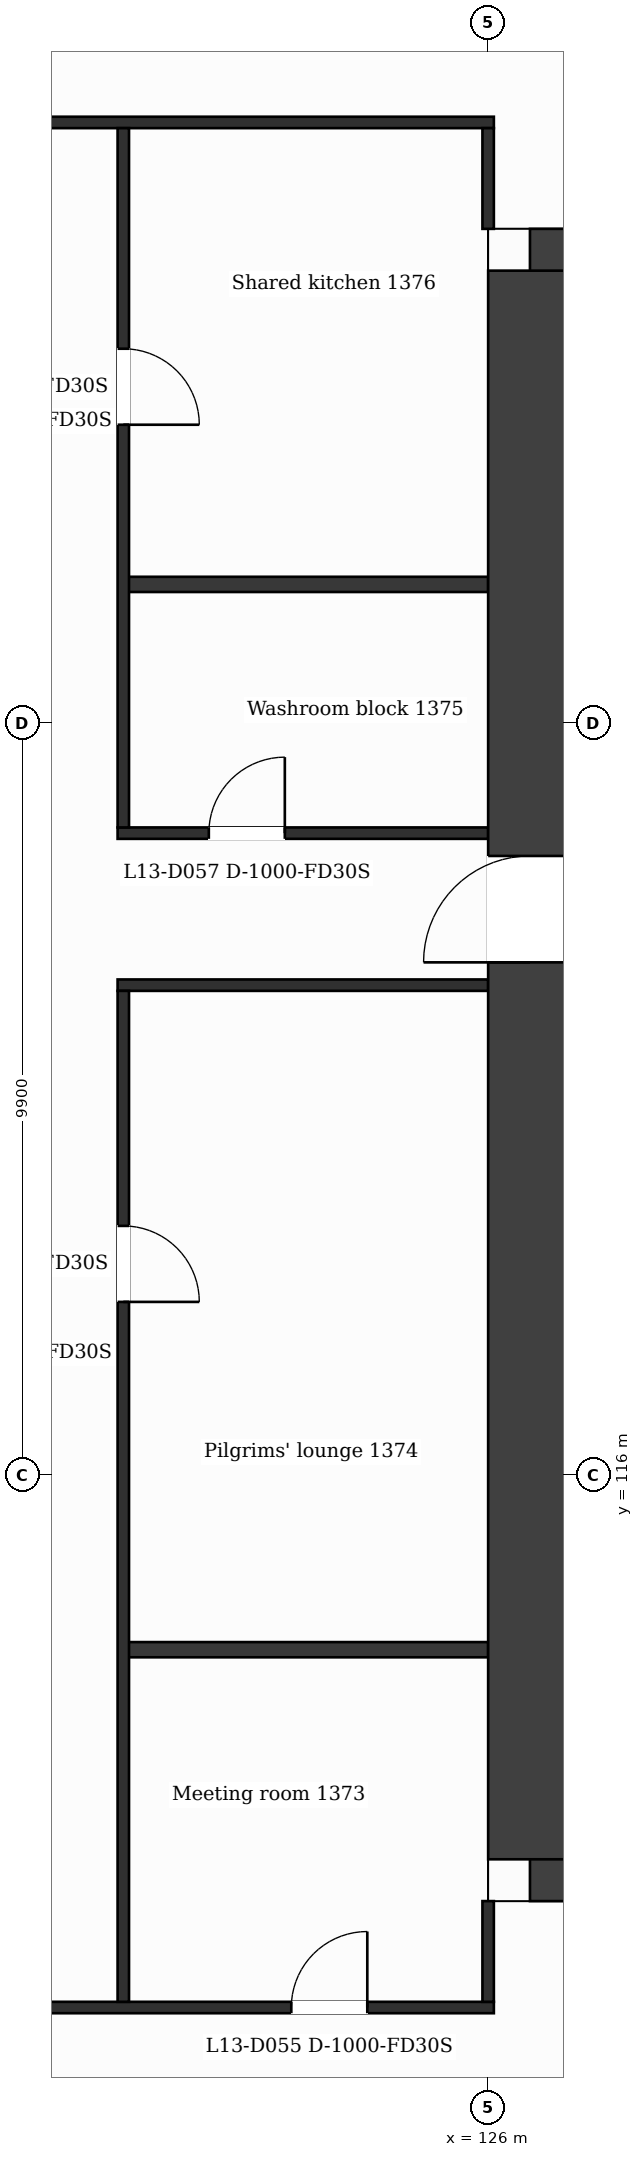
"""IFC4 building model, lengths in metres.
Left out: names, types, materials, properties, quantities, classifications, styles, units other than length and angle.
Written with IfcOpenShell. Run it as: python <this file> out.ifc"""

import sys

from ifc_helpers import new_model, si_unit, direction, frame, frame_2d, origin, place, context, subcontext, project, spatial, rectangle, extrude, element, fill, save


model = new_model("IFC4")
c1 = context("Model", 3, precision=1e-05, world=origin(), true_north=direction((0.0, 1.0)))
c2 = subcontext(c1, "Body", "Model", "MODEL_VIEW")
j1 = project(units=[si_unit("LENGTHUNIT", "METRE"), si_unit("PLANEANGLEUNIT", "RADIAN")], contexts=[c1])
p1 = place(None, origin())
s1 = spatial("IfcSite", under=j1, at=p1, CompositionType="ELEMENT")
p2 = place(p1, origin())
s2 = spatial("IfcBuilding", under=s1, at=p2, CompositionType="ELEMENT")
p3 = place(p2, frame((0.0, 0.0, 63.5)))
s3 = spatial("IfcBuildingStorey", under=s2, at=p3, CompositionType="ELEMENT", Elevation=63.5)
p4 = place(p3, frame((126.55, 131.85, 0.0), z_axis=(0.0, 0.0, 1.0), x_axis=(1.0, 0.0, 0.0)))
e1 = element("IfcWall", 1, at=p4, inside=s3, PredefinedType="SHEAR", context=c2, shape_type="SweptSolid", body=[
    extrude(rectangle(XDim=11.138, YDim=1.1, at=frame_2d((5.569, 0.0))), origin(), (0.0, 0.0, 1.0), 3.5),
])
p5 = place(p4, frame((3.386, 0.0, 0.0)))
e2 = element("IfcOpeningElement", 2, at=p5, cuts=e1, PredefinedType="OPENING", context=c2, shape_type="SweptSolid", body=[
    extrude(rectangle(XDim=1.2, YDim=2.1, at=frame_2d((0.6, 1.05))), frame((0.0, 0.56, 0.0), z_axis=(0.0, -1.0, 0.0), x_axis=(1.0, 0.0, 0.0)), (0.0, 0.0, 1.0), 1.12),
])
p6 = place(p3, frame((140.502, 110.95, 0.0), z_axis=(0.0, 0.0, 1.0), x_axis=(-1.0, 0.0, 0.0)))
e3 = element("IfcWall", 3, at=p6, inside=s3, PredefinedType="SHEAR", context=c2, shape_type="SweptSolid", body=[
    extrude(rectangle(XDim=13.952, YDim=1.1, at=frame_2d((6.976, 0.0))), origin(), (0.0, 0.0, 1.0), 3.5),
])
p7 = place(p6, frame((6.804, 0.0, 0.0)))
e4 = element("IfcOpeningElement", 4, at=p7, cuts=e3, PredefinedType="OPENING", context=c2, shape_type="SweptSolid", body=[
    extrude(rectangle(XDim=1.4, YDim=2.1, at=frame_2d((0.7, 1.05))), frame((0.0, 0.56, 0.0), z_axis=(0.0, -1.0, 0.0), x_axis=(1.0, 0.0, 0.0)), (0.0, 0.0, 1.0), 1.12),
])
p8 = place(p3, frame((126.55, 110.95, 0.0), z_axis=(0.0, 0.0, 1.0), x_axis=(0.0, 1.0, 0.0)))
e5 = element("IfcWall", 5, at=p8, inside=s3, PredefinedType="SHEAR", context=c2, shape_type="SweptSolid", body=[
    extrude(rectangle(XDim=20.9, YDim=1.1, at=frame_2d((10.45, 0.0))), origin(), (0.0, 0.0, 1.0), 3.5),
])
p9 = place(p8, frame((11.8, 0.0, 0.0)))
e6 = element("IfcOpeningElement", 6, at=p9, cuts=e5, PredefinedType="OPENING", context=c2, shape_type="SweptSolid", body=[
    extrude(rectangle(XDim=1.4, YDim=2.1, at=frame_2d((0.7, 1.05))), frame((0.0, 0.56, 0.0), z_axis=(0.0, -1.0, 0.0), x_axis=(1.0, 0.0, 0.0)), (0.0, 0.0, 1.0), 1.12),
])
p10 = place(p3, frame((100.725, 109.0, 0.0), z_axis=(0.0, 0.0, 1.0), x_axis=(1.0, 0.0, 0.0)))
e7 = element("IfcWall", 7, at=p10, inside=s3, PredefinedType="PARTITIONING", context=c2, shape_type="SweptSolid", body=[
    extrude(rectangle(XDim=25.35, YDim=0.15, at=frame_2d((12.675, 0.0))), origin(), (0.0, 0.0, 1.0), 3.18),
])
p11 = place(p10, frame((1.975, 0.0, 0.0)))
e8 = element("IfcOpeningElement", 8, at=p11, cuts=e7, PredefinedType="OPENING", context=c2, shape_type="SweptSolid", body=[
    extrude(rectangle(XDim=1.0, YDim=2.1, at=frame_2d((0.5, 1.05))), frame((0.0, 0.085, 0.0), z_axis=(0.0, -1.0, 0.0), x_axis=(1.0, 0.0, 0.0)), (0.0, 0.0, 1.0), 0.17),
])
p12 = place(p10, frame((10.325, 0.0, 0.0)))
e9 = element("IfcOpeningElement", 9, at=p12, cuts=e7, PredefinedType="OPENING", context=c2, shape_type="SweptSolid", body=[
    extrude(rectangle(XDim=1.0, YDim=2.1, at=frame_2d((0.5, 1.05))), frame((0.0, 0.085, 0.0), z_axis=(0.0, -1.0, 0.0), x_axis=(1.0, 0.0, 0.0)), (0.0, 0.0, 1.0), 0.17),
])
p13 = place(p10, frame((14.9, 0.0, 0.0)))
e10 = element("IfcOpeningElement", 10, at=p13, cuts=e7, PredefinedType="OPENING", context=c2, shape_type="SweptSolid", body=[
    extrude(rectangle(XDim=1.0, YDim=2.1, at=frame_2d((0.5, 1.05))), frame((0.0, 0.085, 0.0), z_axis=(0.0, -1.0, 0.0), x_axis=(1.0, 0.0, 0.0)), (0.0, 0.0, 1.0), 0.17),
])
p14 = place(p10, frame((22.685, 0.0, 0.0)))
e11 = element("IfcOpeningElement", 11, at=p14, cuts=e7, PredefinedType="OPENING", context=c2, shape_type="SweptSolid", body=[
    extrude(rectangle(XDim=1.0, YDim=2.1, at=frame_2d((0.5, 1.05))), frame((0.0, 0.085, 0.0), z_axis=(0.0, -1.0, 0.0), x_axis=(1.0, 0.0, 0.0)), (0.0, 0.0, 1.0), 0.17),
])
p15 = place(p3, frame((121.2, 113.708, 0.0), z_axis=(0.0, 0.0, 1.0), x_axis=(1.0, 0.0, 0.0)))
e12 = element("IfcWall", 12, at=p15, inside=s3, PredefinedType="PARTITIONING", context=c2, shape_type="SweptSolid", body=[
    extrude(rectangle(XDim=4.8, YDim=0.2, at=frame_2d((2.4, 0.0))), origin(), (0.0, 0.0, 1.0), 3.18),
])
p16 = place(p3, frame((121.125, 122.45, 0.0), z_axis=(0.0, 0.0, 1.0), x_axis=(1.0, 0.0, 0.0)))
e13 = element("IfcWall", 13, at=p16, inside=s3, PredefinedType="PARTITIONING", context=c2, shape_type="SweptSolid", body=[
    extrude(rectangle(XDim=4.875, YDim=0.15, at=frame_2d((2.438, 0.0))), origin(), (0.0, 0.0, 1.0), 3.18),
])
p17 = place(p3, frame((121.125, 124.45, 0.0), z_axis=(0.0, 0.0, 1.0), x_axis=(1.0, 0.0, 0.0)))
e14 = element("IfcWall", 14, at=p17, inside=s3, PredefinedType="PARTITIONING", context=c2, shape_type="SweptSolid", body=[
    extrude(rectangle(XDim=4.875, YDim=0.15, at=frame_2d((2.438, 0.0))), origin(), (0.0, 0.0, 1.0), 3.18),
])
p18 = place(p17, frame((1.2, 0.0, 0.0)))
e15 = element("IfcOpeningElement", 15, at=p18, cuts=e14, PredefinedType="OPENING", context=c2, shape_type="SweptSolid", body=[
    extrude(rectangle(XDim=1.0, YDim=2.1, at=frame_2d((0.5, 1.05))), frame((0.0, 0.085, 0.0), z_axis=(0.0, -1.0, 0.0), x_axis=(1.0, 0.0, 0.0)), (0.0, 0.0, 1.0), 0.17),
])
p19 = place(p3, frame((121.2, 127.722, 0.0), z_axis=(0.0, 0.0, 1.0), x_axis=(1.0, 0.0, 0.0)))
e16 = element("IfcWall", 16, at=p19, inside=s3, PredefinedType="PARTITIONING", context=c2, shape_type="SweptSolid", body=[
    extrude(rectangle(XDim=4.8, YDim=0.2, at=frame_2d((2.4, 0.0))), origin(), (0.0, 0.0, 1.0), 3.18),
])
p20 = place(p3, frame((100.725, 133.8, 0.0), z_axis=(0.0, 0.0, 1.0), x_axis=(1.0, 0.0, 0.0)))
e17 = element("IfcWall", 17, at=p20, inside=s3, PredefinedType="PARTITIONING", context=c2, shape_type="SweptSolid", body=[
    extrude(rectangle(XDim=25.35, YDim=0.15, at=frame_2d((12.675, 0.0))), origin(), (0.0, 0.0, 1.0), 3.18),
])
p21 = place(p3, frame((121.2, 109.075, 0.0), z_axis=(0.0, 0.0, 1.0), x_axis=(0.0, 1.0, 0.0)))
e18 = element("IfcWall", 18, at=p21, inside=s3, PredefinedType="PARTITIONING", context=c2, shape_type="SweptSolid", body=[
    extrude(rectangle(XDim=13.3, YDim=0.15, at=frame_2d((6.65, 0.0))), origin(), (0.0, 0.0, 1.0), 3.18),
])
p22 = place(p21, frame((9.208, 0.0, 0.0)))
e19 = element("IfcOpeningElement", 19, at=p22, cuts=e18, PredefinedType="OPENING", context=c2, shape_type="SweptSolid", body=[
    extrude(rectangle(XDim=1.0, YDim=2.1, at=frame_2d((0.5, 1.05))), frame((0.0, 0.085, 0.0), z_axis=(0.0, -1.0, 0.0), x_axis=(1.0, 0.0, 0.0)), (0.0, 0.0, 1.0), 0.17),
])
p23 = place(p3, frame((121.2, 124.525, 0.0), z_axis=(0.0, 0.0, 1.0), x_axis=(0.0, 1.0, 0.0)))
e20 = element("IfcWall", 20, at=p23, inside=s3, PredefinedType="PARTITIONING", context=c2, shape_type="SweptSolid", body=[
    extrude(rectangle(XDim=9.2, YDim=0.15, at=frame_2d((4.6, 0.0))), origin(), (0.0, 0.0, 1.0), 3.18),
])
p24 = place(p23, frame((5.298, 0.0, 0.0)))
e21 = element("IfcOpeningElement", 21, at=p24, cuts=e20, PredefinedType="OPENING", context=c2, shape_type="SweptSolid", body=[
    extrude(rectangle(XDim=1.0, YDim=2.1, at=frame_2d((0.5, 1.05))), frame((0.0, 0.085, 0.0), z_axis=(0.0, -1.0, 0.0), x_axis=(1.0, 0.0, 0.0)), (0.0, 0.0, 1.0), 0.17),
])
p25 = place(p3, frame((126.0, 109.075, 0.0), z_axis=(0.0, 0.0, 1.0), x_axis=(0.0, 1.0, 0.0)))
e22 = element("IfcWall", 22, at=p25, inside=s3, PredefinedType="PARTITIONING", context=c2, shape_type="SweptSolid", body=[
    extrude(rectangle(XDim=1.325, YDim=0.15, at=frame_2d((0.663, 0.0))), origin(), (0.0, 0.0, 1.0), 3.18),
])
p26 = place(p3, frame((126.0, 132.4, 0.0), z_axis=(0.0, 0.0, 1.0), x_axis=(0.0, 1.0, 0.0)))
e23 = element("IfcWall", 23, at=p26, inside=s3, PredefinedType="PARTITIONING", context=c2, shape_type="SweptSolid", body=[
    extrude(rectangle(XDim=1.325, YDim=0.15, at=frame_2d((0.663, 0.0))), origin(), (0.0, 0.0, 1.0), 3.18),
])
p27 = place(p14, origin())
e24 = element("IfcDoor", 24, at=p27, inside=s3, OperationType="SINGLE_SWING_RIGHT", PredefinedType="DOOR", context=c2, shape_type="SweptSolid", body=[
    extrude(rectangle(XDim=1.0, YDim=2.1, at=frame_2d((0.5, 1.05))), frame((0.0, 0.025, 0.0), z_axis=(0.0, -1.0, 0.0), x_axis=(1.0, 0.0, 0.0)), (0.0, 0.0, 1.0), 0.05),
])
fill(e11, e24)
p28 = place(p22, origin())
e25 = element("IfcDoor", 25, at=p28, inside=s3, OperationType="SINGLE_SWING_LEFT", PredefinedType="DOOR", context=c2, shape_type="SweptSolid", body=[
    extrude(rectangle(XDim=1.0, YDim=2.1, at=frame_2d((0.5, 1.05))), frame((0.0, 0.025, 0.0), z_axis=(0.0, -1.0, 0.0), x_axis=(1.0, 0.0, 0.0)), (0.0, 0.0, 1.0), 0.05),
])
fill(e19, e25)
p29 = place(p18, origin())
e26 = element("IfcDoor", 26, at=p29, inside=s3, OperationType="SINGLE_SWING_RIGHT", PredefinedType="DOOR", context=c2, shape_type="SweptSolid", body=[
    extrude(rectangle(XDim=1.0, YDim=2.1, at=frame_2d((0.5, 1.05))), frame((0.0, 0.025, 0.0), z_axis=(0.0, -1.0, 0.0), x_axis=(1.0, 0.0, 0.0)), (0.0, 0.0, 1.0), 0.05),
])
fill(e15, e26)
p30 = place(p24, origin())
e27 = element("IfcDoor", 27, at=p30, inside=s3, OperationType="SINGLE_SWING_LEFT", PredefinedType="DOOR", context=c2, shape_type="SweptSolid", body=[
    extrude(rectangle(XDim=1.0, YDim=2.1, at=frame_2d((0.5, 1.05))), frame((0.0, 0.025, 0.0), z_axis=(0.0, -1.0, 0.0), x_axis=(1.0, 0.0, 0.0)), (0.0, 0.0, 1.0), 0.05),
])
fill(e21, e27)
p31 = place(p9, origin())
e28 = element("IfcDoor", 28, at=p31, inside=s3, OperationType="SINGLE_SWING_LEFT", PredefinedType="DOOR", context=c2, shape_type="SweptSolid", body=[
    extrude(rectangle(XDim=1.4, YDim=2.1, at=frame_2d((0.7, 1.05))), frame((0.0, 0.025, 0.0), z_axis=(0.0, -1.0, 0.0), x_axis=(1.0, 0.0, 0.0)), (0.0, 0.0, 1.0), 0.05),
])
fill(e6, e28)
save(model, sys.argv[1])
